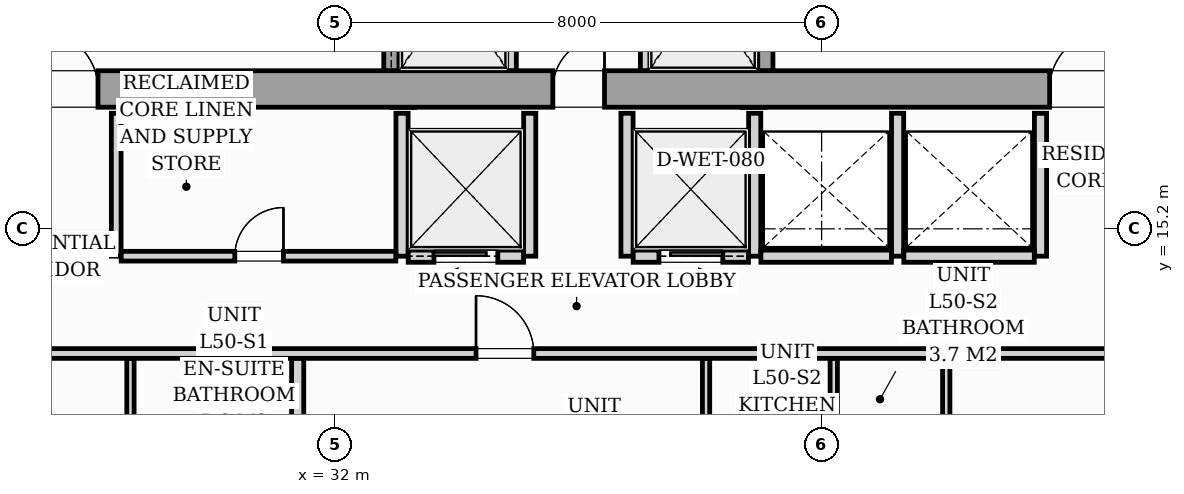
"""IFC4 building model, lengths in metres.
Left out: names, types, materials, properties, quantities, classifications, styles, units other than length and angle.
Written with IfcOpenShell. Run it as: python <this file> out.ifc"""

import sys

from ifc_helpers import new_model, si_unit, direction, frame, frame_2d, origin, origin_2d, place, context, subcontext, project, spatial, rectangle, i_section, extrude, source, transform, mapped, element, fill, save


model = new_model("IFC4")
c1 = context("Model", 3, precision=1e-05, world=origin(), true_north=direction((0.0, 1.0)))
c2 = subcontext(c1, "Body", "Model", "MODEL_VIEW")
j1 = project(units=[si_unit("LENGTHUNIT", "METRE"), si_unit("PLANEANGLEUNIT", "RADIAN")], contexts=[c1])
p1 = place(None, origin())
s1 = spatial("IfcSite", under=j1, at=p1, CompositionType="ELEMENT")
p2 = place(p1, origin())
s2 = spatial("IfcBuilding", under=s1, at=p2, CompositionType="ELEMENT")
p3 = place(p2, frame((0.0, 0.0, 176.2)))
s3 = spatial("IfcBuildingStorey", under=s2, at=p3, CompositionType="ELEMENT", Elevation=176.2)
m1 = source(origin(), c2, "Body", "SweptSolid", [
    extrude(i_section(OverallWidth=0.416, OverallDepth=0.446, WebThickness=0.039, FlangeThickness=0.063, FilletRadius=0.018, at=origin_2d()), origin(), (0.0, 0.0, 1.0), 3.196),
])
for number, where, z_axis, x_axis in (
    (1, (33.12, 17.4, 0.002), (0.0, 0.0, 1.0), (1.0, 0.0, 0.0)),
    (2, (38.88, 17.4, 0.002), (0.0, 0.0, 1.0), (1.0, 0.0, 0.0)),
):
    element("IfcColumn", number, at=place(p3, frame(where, z_axis=z_axis, x_axis=x_axis)), inside=s3, PredefinedType="PILASTER", context=c2, shape_type="MappedRepresentation", body=[
        mapped(m1, transform((0.0, 0.0, 0.0), scale=1.0)),
    ])
p4 = place(p3, frame((26.2, 17.5, 0.0), z_axis=(0.0, 0.0, 1.0), x_axis=(1.0, 0.0, 0.0)))
e3 = element("IfcWall", 3, at=p4, inside=s3, PredefinedType="SHEAR", context=c2, shape_type="SweptSolid", body=[
    extrude(rectangle(XDim=19.6, YDim=0.6, at=frame_2d((9.8, 0.0))), origin(), (0.0, 0.0, 1.0), 3.2),
])
p5 = place(p4, frame((0.95, 0.0, 0.0)))
e4 = element("IfcOpeningElement", 4, at=p5, cuts=e3, PredefinedType="OPENING", context=c2, shape_type="SweptSolid", body=[
    extrude(rectangle(XDim=0.95, YDim=2.06, at=frame_2d((0.475, 1.03))), frame((0.0, 0.31, 0.0), z_axis=(0.0, -1.0, 0.0), x_axis=(1.0, 0.0, 0.0)), (0.0, 0.0, 1.0), 0.62),
])
p6 = place(p4, frame((9.38, 0.0, 0.0)))
e5 = element("IfcOpeningElement", 5, at=p6, cuts=e3, PredefinedType="OPENING", context=c2, shape_type="SweptSolid", body=[
    extrude(rectangle(XDim=0.85, YDim=2.0, at=frame_2d((0.425, 1.0))), frame((0.0, 0.31, 0.0), z_axis=(0.0, -1.0, 0.0), x_axis=(1.0, 0.0, 0.0)), (0.0, 0.0, 1.0), 0.62),
])
p7 = place(p4, frame((17.55, 0.0, 0.0)))
e6 = element("IfcOpeningElement", 6, at=p7, cuts=e3, PredefinedType="OPENING", context=c2, shape_type="SweptSolid", body=[
    extrude(rectangle(XDim=0.95, YDim=2.06, at=frame_2d((0.475, 1.03))), frame((0.0, 0.31, 0.0), z_axis=(0.0, -1.0, 0.0), x_axis=(1.0, 0.0, 0.0)), (0.0, 0.0, 1.0), 0.62),
])
p8 = place(p3, frame((32.925, 17.802, 0.0), z_axis=(0.0, 0.0, 1.0), x_axis=(0.0, 1.0, 0.0)))
e7 = element("IfcWall", 7, at=p8, inside=s3, PredefinedType="SOLIDWALL", context=c2, shape_type="SweptSolid", body=[
    extrude(rectangle(XDim=2.646, YDim=0.25, at=frame_2d((1.323, 0.0))), origin(), (0.0, 0.0, 1.0), 3.2),
])
p9 = place(p8, frame((0.548, 0.0, 0.0)))
e8 = element("IfcOpeningElement", 8, at=p9, cuts=e7, PredefinedType="OPENING", context=c2, shape_type="SweptSolid", body=[
    extrude(rectangle(XDim=1.1, YDim=2.08, at=frame_2d((0.55, 1.04))), frame((0.0, 0.135, 0.0), z_axis=(0.0, -1.0, 0.0), x_axis=(1.0, 0.0, 0.0)), (0.0, 0.0, 1.0), 0.27),
])
for number, where, z_axis, x_axis in (
    (9, (34.9, 17.802, 0.0), (0.0, 0.0, 1.0), (0.0, 1.0, 0.0)),
    (10, (37.1, 17.802, 0.0), (0.0, 0.0, 1.0), (0.0, 1.0, 0.0)),
):
    element("IfcWall", number, at=place(p3, frame(where, z_axis=z_axis, x_axis=x_axis)), inside=s3, PredefinedType="PARTITIONING", context=c2, shape_type="SweptSolid", body=[
        extrude(rectangle(XDim=2.646, YDim=0.16, at=frame_2d((1.323, 0.0))), origin(), (0.0, 0.0, 1.0), 2.94),
    ])
p10 = place(p3, frame((39.075, 17.802, 0.0), z_axis=(0.0, 0.0, 1.0), x_axis=(0.0, 1.0, 0.0)))
e11 = element("IfcWall", 11, at=p10, inside=s3, PredefinedType="SOLIDWALL", context=c2, shape_type="SweptSolid", body=[
    extrude(rectangle(XDim=2.646, YDim=0.25, at=frame_2d((1.323, 0.0))), origin(), (0.0, 0.0, 1.0), 3.2),
])
p11 = place(p10, frame((0.548, 0.0, 0.0)))
e12 = element("IfcOpeningElement", 12, at=p11, cuts=e11, PredefinedType="OPENING", context=c2, shape_type="SweptSolid", body=[
    extrude(rectangle(XDim=1.1, YDim=2.08, at=frame_2d((0.55, 1.04))), frame((0.0, 0.135, 0.0), z_axis=(0.0, -1.0, 0.0), x_axis=(1.0, 0.0, 0.0)), (0.0, 0.0, 1.0), 0.27),
])
p12 = place(p3, frame((28.4, 14.75, 0.0), z_axis=(0.0, 0.0, 1.0), x_axis=(0.0, 1.0, 0.0)))
e13 = element("IfcWall", 13, at=p12, inside=s3, PredefinedType="PARTITIONING", context=c2, shape_type="SweptSolid", body=[
    extrude(rectangle(XDim=2.35, YDim=0.16, at=frame_2d((1.175, 0.0))), origin(), (0.0, 0.0, 1.0), 2.94),
])
p13 = place(p3, frame((33.1, 14.75, 0.0), z_axis=(0.0, 0.0, 1.0), x_axis=(0.0, 1.0, 0.0)))
e14 = element("IfcWall", 14, at=p13, inside=s3, PredefinedType="PARTITIONING", context=c2, shape_type="SweptSolid", body=[
    extrude(rectangle(XDim=2.35, YDim=0.2, at=frame_2d((1.175, 0.0))), origin(), (0.0, 0.0, 1.0), 2.94),
])
p14 = place(p3, frame((28.482, 14.75, 0.0), z_axis=(0.0, 0.0, 1.0), x_axis=(1.0, 0.0, 0.0)))
e15 = element("IfcWall", 15, at=p14, inside=s3, PredefinedType="PARTITIONING", context=c2, shape_type="SweptSolid", body=[
    extrude(rectangle(XDim=4.516, YDim=0.16, at=frame_2d((2.258, 0.0))), origin(), (0.0, 0.0, 1.0), 2.94),
])
p15 = place(p14, frame((1.868, 0.0, 0.0)))
e16 = element("IfcOpeningElement", 16, at=p15, cuts=e15, PredefinedType="OPENING", context=c2, shape_type="SweptSolid", body=[
    extrude(rectangle(XDim=0.8, YDim=2.05, at=frame_2d((0.4, 1.025))), frame((0.0, 0.09, 0.0), z_axis=(0.0, -1.0, 0.0), x_axis=(1.0, 0.0, 0.0)), (0.0, 0.0, 1.0), 0.18),
])
p16 = place(p3, frame((35.2, 14.75, 0.0), z_axis=(0.0, 0.0, 1.0), x_axis=(0.0, 1.0, 0.0)))
e17 = element("IfcWall", 17, at=p16, inside=s3, PredefinedType="PARTITIONING", context=c2, shape_type="SweptSolid", body=[
    extrude(rectangle(XDim=2.35, YDim=0.2, at=frame_2d((1.175, 0.0))), origin(), (0.0, 0.0, 1.0), 2.94),
])
p17 = place(p3, frame((33.202, 14.75, 0.0), z_axis=(0.0, 0.0, 1.0), x_axis=(1.0, 0.0, 0.0)))
e18 = element("IfcWall", 18, at=p17, inside=s3, PredefinedType="PARTITIONING", context=c2, shape_type="SweptSolid", body=[
    extrude(rectangle(XDim=1.896, YDim=0.2, at=frame_2d((0.948, 0.0))), origin(), (0.0, 0.0, 1.0), 2.94),
])
p18 = place(p17, frame((0.423, 0.0, 0.0)))
e19 = element("IfcOpeningElement", 19, at=p18, cuts=e18, PredefinedType="OPENING", context=c2, shape_type="SweptSolid", body=[
    extrude(rectangle(XDim=1.05, YDim=2.08, at=frame_2d((0.525, 1.04))), frame((0.0, 0.11, 0.0), z_axis=(0.0, -1.0, 0.0), x_axis=(1.0, 0.0, 0.0)), (0.0, 0.0, 1.0), 0.22),
])
for number, where, z_axis, x_axis in (
    (20, (36.8, 14.75, 0.0), (0.0, 0.0, 1.0), (0.0, 1.0, 0.0)),
    (21, (38.9, 14.75, 0.0), (0.0, 0.0, 1.0), (0.0, 1.0, 0.0)),
):
    element("IfcWall", number, at=place(p3, frame(where, z_axis=z_axis, x_axis=x_axis)), inside=s3, PredefinedType="PARTITIONING", context=c2, shape_type="SweptSolid", body=[
        extrude(rectangle(XDim=2.35, YDim=0.2, at=frame_2d((1.175, 0.0))), origin(), (0.0, 0.0, 1.0), 2.94),
    ])
p19 = place(p3, frame((36.902, 14.75, 0.0), z_axis=(0.0, 0.0, 1.0), x_axis=(1.0, 0.0, 0.0)))
e22 = element("IfcWall", 22, at=p19, inside=s3, PredefinedType="PARTITIONING", context=c2, shape_type="SweptSolid", body=[
    extrude(rectangle(XDim=1.896, YDim=0.2, at=frame_2d((0.948, 0.0))), origin(), (0.0, 0.0, 1.0), 2.94),
])
p20 = place(p19, frame((0.423, 0.0, 0.0)))
e23 = element("IfcOpeningElement", 23, at=p20, cuts=e22, PredefinedType="OPENING", context=c2, shape_type="SweptSolid", body=[
    extrude(rectangle(XDim=1.05, YDim=2.08, at=frame_2d((0.525, 1.04))), frame((0.0, 0.11, 0.0), z_axis=(0.0, -1.0, 0.0), x_axis=(1.0, 0.0, 0.0)), (0.0, 0.0, 1.0), 0.22),
])
for number, where, z_axis, x_axis in (
    (24, (41.25, 14.75, 0.0), (0.0, 0.0, 1.0), (0.0, 1.0, 0.0)),
    (25, (43.6, 14.75, 0.0), (0.0, 0.0, 1.0), (0.0, 1.0, 0.0)),
):
    element("IfcWall", number, at=place(p3, frame(where, z_axis=z_axis, x_axis=x_axis)), inside=s3, PredefinedType="PARTITIONING", context=c2, shape_type="SweptSolid", body=[
        extrude(rectangle(XDim=2.35, YDim=0.2, at=frame_2d((1.175, 0.0))), origin(), (0.0, 0.0, 1.0), 2.94),
    ])
for number, where, z_axis, x_axis in (
    (26, (39.002, 14.75, 0.0), (0.0, 0.0, 1.0), (1.0, 0.0, 0.0)),
    (27, (41.352, 14.75, 0.0), (0.0, 0.0, 1.0), (1.0, 0.0, 0.0)),
):
    element("IfcWall", number, at=place(p3, frame(where, z_axis=z_axis, x_axis=x_axis)), inside=s3, PredefinedType="PARTITIONING", context=c2, shape_type="SweptSolid", body=[
        extrude(rectangle(XDim=2.146, YDim=0.2, at=frame_2d((1.073, 0.0))), origin(), (0.0, 0.0, 1.0), 2.94),
    ])
p21 = place(p3, frame((22.6, 13.15, 0.0), z_axis=(0.0, 0.0, 1.0), x_axis=(1.0, 0.0, 0.0)))
e28 = element("IfcWall", 28, at=p21, inside=s3, PredefinedType="PARTITIONING", context=c2, shape_type="SweptSolid", body=[
    extrude(rectangle(XDim=23.28, YDim=0.16, at=frame_2d((11.64, 0.0))), origin(), (0.0, 0.0, 1.0), 2.94),
])
p22 = place(p21, frame((0.607, 0.0, 0.0)))
e29 = element("IfcOpeningElement", 29, at=p22, cuts=e28, PredefinedType="OPENING", context=c2, shape_type="SweptSolid", body=[
    extrude(rectangle(XDim=0.95, YDim=2.06, at=frame_2d((0.475, 1.03))), frame((0.0, 0.09, 0.0), z_axis=(0.0, -1.0, 0.0), x_axis=(1.0, 0.0, 0.0)), (0.0, 0.0, 1.0), 0.18),
])
p23 = place(p21, frame((11.717, 0.0, 0.0)))
e30 = element("IfcOpeningElement", 30, at=p23, cuts=e28, PredefinedType="OPENING", context=c2, shape_type="SweptSolid", body=[
    extrude(rectangle(XDim=0.95, YDim=2.06, at=frame_2d((0.475, 1.03))), frame((0.0, 0.09, 0.0), z_axis=(0.0, -1.0, 0.0), x_axis=(1.0, 0.0, 0.0)), (0.0, 0.0, 1.0), 0.18),
])
p24 = place(p3, frame((28.634, 7.503, 0.0), z_axis=(0.0, 0.0, 1.0), x_axis=(0.0, 1.0, 0.0)))
e31 = element("IfcWall", 31, at=p24, inside=s3, PredefinedType="PARTITIONING", context=c2, shape_type="SweptSolid", body=[
    extrude(rectangle(XDim=5.565, YDim=0.12, at=frame_2d((2.782, 0.0))), origin(), (0.0, 0.0, 1.0), 2.94),
])
p25 = place(p24, frame((2.297, 0.0, 0.0)))
e32 = element("IfcOpeningElement", 32, at=p25, cuts=e31, PredefinedType="OPENING", context=c2, shape_type="SweptSolid", body=[
    extrude(rectangle(XDim=0.9, YDim=2.05, at=frame_2d((0.45, 1.025))), frame((0.0, 0.07, 0.0), z_axis=(0.0, -1.0, 0.0), x_axis=(1.0, 0.0, 0.0)), (0.0, 0.0, 1.0), 0.14),
])
p26 = place(p3, frame((31.384, 10.912, 0.0), z_axis=(0.0, 0.0, 1.0), x_axis=(0.0, 1.0, 0.0)))
e33 = element("IfcWall", 33, at=p26, inside=s3, PredefinedType="PARTITIONING", context=c2, shape_type="SweptSolid", body=[
    extrude(rectangle(XDim=2.156, YDim=0.2, at=frame_2d((1.078, 0.0))), origin(), (0.0, 0.0, 1.0), 2.94),
])
p27 = place(p3, frame((42.05, 8.612, 0.0), z_axis=(0.0, 0.0, 1.0), x_axis=(0.0, 1.0, 0.0)))
e34 = element("IfcWall", 34, at=p27, inside=s3, PredefinedType="PARTITIONING", context=c2, shape_type="SweptSolid", body=[
    extrude(rectangle(XDim=4.456, YDim=0.12, at=frame_2d((2.228, 0.0))), origin(), (0.0, 0.0, 1.0), 2.94),
])
p28 = place(p27, frame((2.386, 0.0, 0.0)))
e35 = element("IfcOpeningElement", 35, at=p28, cuts=e34, PredefinedType="OPENING", context=c2, shape_type="SweptSolid", body=[
    extrude(rectangle(XDim=0.9, YDim=2.05, at=frame_2d((0.45, 1.025))), frame((0.0, 0.07, 0.0), z_axis=(0.0, -1.0, 0.0), x_axis=(1.0, 0.0, 0.0)), (0.0, 0.0, 1.0), 0.14),
])
for number, where, z_axis, x_axis in (
    (36, (40.2, 10.962, 0.0), (0.0, 0.0, 1.0), (0.0, 1.0, 0.0)),
    (37, (38.1, 10.962, 0.0), (0.0, 0.0, 1.0), (0.0, 1.0, 0.0)),
):
    element("IfcWall", number, at=place(p3, frame(where, z_axis=z_axis, x_axis=x_axis)), inside=s3, PredefinedType="PARTITIONING", context=c2, shape_type="SweptSolid", body=[
        extrude(rectangle(XDim=2.106, YDim=0.12, at=frame_2d((1.053, 0.0))), origin(), (0.0, 0.0, 1.0), 2.94),
    ])
m2 = source(origin(), c2, "Body", "SweptSolid", [
    extrude(rectangle(XDim=0.95, YDim=2.06, at=frame_2d((0.475, 1.03))), frame((0.0, 0.025, 0.0), z_axis=(0.0, -1.0, 0.0), x_axis=(1.0, 0.0, 0.0)), (0.0, 0.0, 1.0), 0.05),
])
p29 = place(p5, origin())
e38 = element("IfcDoor", 38, at=p29, inside=s3, OperationType="SINGLE_SWING_LEFT", PredefinedType="DOOR", context=c2, shape_type="MappedRepresentation", body=[
    mapped(m2, transform((0.0, 0.0, 0.0), scale=1.0)),
])
fill(e4, e38)
m3 = source(origin(), c2, "Body", "SweptSolid", [
    extrude(rectangle(XDim=0.85, YDim=2.0, at=frame_2d((0.425, 1.0))), frame((0.0, 0.025, 0.0), z_axis=(0.0, -1.0, 0.0), x_axis=(1.0, 0.0, 0.0)), (0.0, 0.0, 1.0), 0.05),
])
p30 = place(p6, origin())
e39 = element("IfcDoor", 39, at=p30, inside=s3, OperationType="SINGLE_SWING_RIGHT", PredefinedType="DOOR", context=c2, shape_type="MappedRepresentation", body=[
    mapped(m3, transform((0.0, 0.0, 0.0), scale=1.0)),
])
fill(e5, e39)
p31 = place(p7, origin())
e40 = element("IfcDoor", 40, at=p31, inside=s3, OperationType="SINGLE_SWING_RIGHT", PredefinedType="DOOR", context=c2, shape_type="MappedRepresentation", body=[
    mapped(m2, transform((0.0, 0.0, 0.0), scale=1.0)),
])
fill(e6, e40)
m4 = source(origin(), c2, "Body", "SweptSolid", [
    extrude(rectangle(XDim=0.8, YDim=2.05, at=frame_2d((0.4, 1.025))), frame((0.0, 0.025, 0.0), z_axis=(0.0, -1.0, 0.0), x_axis=(1.0, 0.0, 0.0)), (0.0, 0.0, 1.0), 0.05),
])
p32 = place(p15, origin())
e41 = element("IfcDoor", 41, at=p32, inside=s3, OperationType="SINGLE_SWING_RIGHT", PredefinedType="DOOR", context=c2, shape_type="MappedRepresentation", body=[
    mapped(m4, transform((0.0, 0.0, 0.0), scale=1.0)),
])
fill(e16, e41)
m5 = source(origin(), c2, "Body", "SweptSolid", [
    extrude(rectangle(XDim=1.05, YDim=2.08, at=frame_2d((0.525, 1.04))), frame((0.0, 0.025, 0.0), z_axis=(0.0, -1.0, 0.0), x_axis=(1.0, 0.0, 0.0)), (0.0, 0.0, 1.0), 0.05),
])
p33 = place(p18, origin())
e42 = element("IfcDoor", 42, at=p33, inside=s3, OperationType="SLIDING_TO_LEFT", PredefinedType="DOOR", context=c2, shape_type="MappedRepresentation", body=[
    mapped(m5, transform((0.0, 0.0, 0.0), scale=1.0)),
])
fill(e19, e42)
p34 = place(p20, origin())
e43 = element("IfcDoor", 43, at=p34, inside=s3, OperationType="SLIDING_TO_RIGHT", PredefinedType="DOOR", context=c2, shape_type="MappedRepresentation", body=[
    mapped(m5, transform((0.0, 0.0, 0.0), scale=1.0)),
])
fill(e23, e43)
m6 = source(origin(), c2, "Body", "SweptSolid", [
    extrude(rectangle(XDim=0.95, YDim=2.06, at=frame_2d((0.475, 1.03))), frame((0.0, 0.025, 0.0), z_axis=(0.0, -1.0, 0.0), x_axis=(1.0, 0.0, 0.0)), (0.0, 0.0, 1.0), 0.05),
])
p35 = place(p23, origin())
e44 = element("IfcDoor", 44, at=p35, inside=s3, OperationType="SINGLE_SWING_LEFT", PredefinedType="DOOR", context=c2, shape_type="MappedRepresentation", body=[
    mapped(m6, transform((0.0, 0.0, 0.0), scale=1.0)),
])
fill(e30, e44)
save(model, sys.argv[1])
